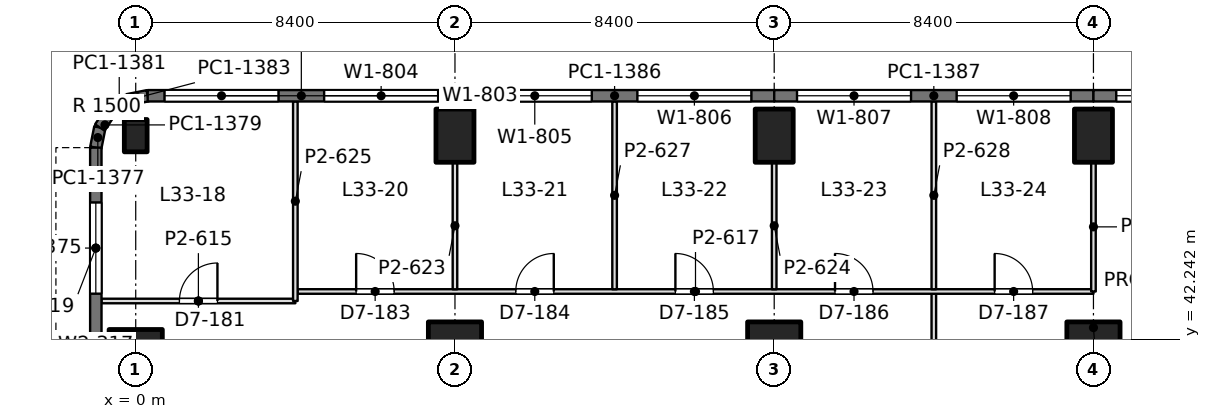
"""IFC4 building model, lengths in metres.
Left out: names, types, materials, properties, quantities, classifications, styles, units other than length and angle.
Written with IfcOpenShell. Run it as: python <this file> out.ifc"""

import sys

from ifc_helpers import new_model, si_unit, direction, frame, frame_2d, origin, origin_2d, place, context, subcontext, project, spatial, rectangle, extrude, element, fill, save


model = new_model("IFC4")
c1 = context("Model", 3, precision=1e-05, world=origin(), true_north=direction((0.0, 1.0)))
c2 = subcontext(c1, "Body", "Model", "MODEL_VIEW")
j1 = project(units=[si_unit("LENGTHUNIT", "METRE"), si_unit("PLANEANGLEUNIT", "RADIAN")], contexts=[c1])
p1 = place(None, origin())
s1 = spatial("IfcSite", under=j1, at=p1, CompositionType="ELEMENT")
p2 = place(p1, origin())
s2 = spatial("IfcBuilding", under=s1, at=p2, CompositionType="ELEMENT")
p3 = place(p2, frame((0.0, 0.0, 147.0)))
s3 = spatial("IfcBuildingStorey", under=s2, at=p3, CompositionType="ELEMENT", Elevation=147.0)
p4 = place(p3, frame((0.0, 42.0, 0.0), z_axis=(0.0, 0.0, 1.0), x_axis=(0.0, 1.0, 0.0)))
e1 = element("IfcColumn", 1, at=p4, inside=s3, PredefinedType="COLUMN", context=c2, shape_type="SweptSolid", body=[
    extrude(rectangle(XDim=1.0, YDim=1.4, at=origin_2d()), origin(), (0.0, 0.0, 1.0), 4.2),
])
p5 = place(p3, frame((0.0, 47.6, 0.0), z_axis=(0.0, 0.0, 1.0), x_axis=(1.0, 0.0, 0.0)))
e2 = element("IfcColumn", 2, at=p5, inside=s3, PredefinedType="COLUMN", context=c2, shape_type="SweptSolid", body=[
    extrude(rectangle(XDim=0.6, YDim=0.85, at=origin_2d()), origin(), (0.0, 0.0, 1.0), 4.2),
])
p6 = place(p3, frame((8.4, 42.0, 0.0), z_axis=(0.0, 0.0, 1.0), x_axis=(1.0, 0.0, 0.0)))
e3 = element("IfcColumn", 3, at=p6, inside=s3, PredefinedType="COLUMN", context=c2, shape_type="SweptSolid", body=[
    extrude(rectangle(XDim=1.4, YDim=1.4, at=origin_2d()), origin(), (0.0, 0.0, 1.0), 4.2),
])
p7 = place(p3, frame((8.4, 47.6, 0.0), z_axis=(0.0, 0.0, 1.0), x_axis=(1.0, 0.0, 0.0)))
e4 = element("IfcColumn", 4, at=p7, inside=s3, PredefinedType="COLUMN", context=c2, shape_type="SweptSolid", body=[
    extrude(rectangle(XDim=1.0, YDim=1.4, at=origin_2d()), origin(), (0.0, 0.0, 1.0), 4.2),
])
p8 = place(p3, frame((16.8, 42.0, 0.0), z_axis=(0.0, 0.0, 1.0), x_axis=(1.0, 0.0, 0.0)))
e5 = element("IfcColumn", 5, at=p8, inside=s3, PredefinedType="COLUMN", context=c2, shape_type="SweptSolid", body=[
    extrude(rectangle(XDim=1.4, YDim=1.4, at=origin_2d()), origin(), (0.0, 0.0, 1.0), 4.2),
])
p9 = place(p3, frame((16.8, 47.6, 0.0), z_axis=(0.0, 0.0, 1.0), x_axis=(1.0, 0.0, 0.0)))
e6 = element("IfcColumn", 6, at=p9, inside=s3, PredefinedType="COLUMN", context=c2, shape_type="SweptSolid", body=[
    extrude(rectangle(XDim=1.0, YDim=1.4, at=origin_2d()), origin(), (0.0, 0.0, 1.0), 4.2),
])
p10 = place(p3, frame((25.2, 42.0, 0.0), z_axis=(0.0, 0.0, 1.0), x_axis=(1.0, 0.0, 0.0)))
e7 = element("IfcColumn", 7, at=p10, inside=s3, PredefinedType="COLUMN", context=c2, shape_type="SweptSolid", body=[
    extrude(rectangle(XDim=1.4, YDim=1.4, at=origin_2d()), origin(), (0.0, 0.0, 1.0), 4.2),
])
p11 = place(p3, frame((25.2, 47.6, 0.0), z_axis=(0.0, 0.0, 1.0), x_axis=(1.0, 0.0, 0.0)))
e8 = element("IfcColumn", 8, at=p11, inside=s3, PredefinedType="COLUMN", context=c2, shape_type="SweptSolid", body=[
    extrude(rectangle(XDim=1.0, YDim=1.4, at=origin_2d()), origin(), (0.0, 0.0, 1.0), 4.2),
])
p12 = place(p3, frame((-1.05, 42.0, 0.0), z_axis=(0.0, 0.0, 1.0), x_axis=(0.0, 1.0, 0.0)))
e9 = element("IfcWall", 9, at=p12, inside=s3, PredefinedType="SOLIDWALL", context=c2, shape_type="SweptSolid", body=[
    extrude(rectangle(XDim=5.285, YDim=0.3, at=frame_2d((2.643, 0.0))), origin(), (0.0, 0.0, 1.0), 4.05),
])
p13 = place(p12, frame((1.443, 0.0, 0.9)))
e10 = element("IfcOpeningElement", 10, at=p13, cuts=e9, PredefinedType="OPENING", context=c2, shape_type="SweptSolid", body=[
    extrude(rectangle(XDim=2.4, YDim=1.9, at=frame_2d((1.2, 0.95))), frame((0.0, 0.16, 0.0), z_axis=(0.0, -1.0, 0.0), x_axis=(1.0, 0.0, 0.0)), (0.0, 0.0, 1.0), 0.32),
])
p14 = place(p3, frame((-1.05, 47.285, 0.0), z_axis=(0.0, 0.0, 1.0), x_axis=(0.195073962632, 0.980788534345, 0.0)))
e11 = element("IfcWall", 11, at=p14, inside=s3, PredefinedType="SOLIDWALL", context=c2, shape_type="SweptSolid", body=[
    extrude(rectangle(XDim=0.541, YDim=0.3, at=frame_2d((0.271, 0.0))), origin(), (0.0, 0.0, 1.0), 4.05),
])
p15 = place(p3, frame((-0.945, 47.815, 0.0), z_axis=(0.0, 0.0, 1.0), x_axis=(0.55534295404, 0.831621430339, 0.0)))
e12 = element("IfcWall", 12, at=p15, inside=s3, PredefinedType="SOLIDWALL", context=c2, shape_type="SweptSolid", body=[
    extrude(rectangle(XDim=0.526, YDim=0.3, at=frame_2d((0.263, 0.0))), origin(), (0.0, 0.0, 1.0), 4.05),
])
p16 = place(p3, frame((-0.653, 48.253, 0.0), z_axis=(0.0, 0.0, 1.0), x_axis=(0.831692711774, 0.555236195849, 0.0)))
e13 = element("IfcWall", 13, at=p16, inside=s3, PredefinedType="SOLIDWALL", context=c2, shape_type="SweptSolid", body=[
    extrude(rectangle(XDim=0.525, YDim=0.3, at=frame_2d((0.263, 0.0))), origin(), (0.0, 0.0, 1.0), 4.05),
])
p17 = place(p3, frame((-0.216, 48.544, 0.0), z_axis=(0.0, 0.0, 1.0), x_axis=(0.980788534345, 0.195073962632, 0.0)))
e14 = element("IfcWall", 14, at=p17, inside=s3, PredefinedType="SOLIDWALL", context=c2, shape_type="SweptSolid", body=[
    extrude(rectangle(XDim=0.541, YDim=0.3, at=frame_2d((0.271, 0.0))), origin(), (0.0, 0.0, 1.0), 4.05),
])
p18 = place(p3, frame((0.315, 48.65, 0.0), z_axis=(0.0, 0.0, 1.0), x_axis=(1.0, 0.0, 0.0)))
e15 = element("IfcWall", 15, at=p18, inside=s3, PredefinedType="SOLIDWALL", context=c2, shape_type="SweptSolid", body=[
    extrude(rectangle(XDim=8.085, YDim=0.3, at=frame_2d((4.042, 0.0))), origin(), (0.0, 0.0, 1.0), 4.05),
])
p19 = place(p18, frame((0.443, 0.0, 0.9)))
e16 = element("IfcOpeningElement", 16, at=p19, cuts=e15, PredefinedType="OPENING", context=c2, shape_type="SweptSolid", body=[
    extrude(rectangle(XDim=3.0, YDim=1.9, at=frame_2d((1.5, 0.95))), frame((0.0, 0.16, 0.0), z_axis=(0.0, -1.0, 0.0), x_axis=(1.0, 0.0, 0.0)), (0.0, 0.0, 1.0), 0.32),
])
p20 = place(p18, frame((4.643, 0.0, 0.9)))
e17 = element("IfcOpeningElement", 17, at=p20, cuts=e15, PredefinedType="OPENING", context=c2, shape_type="SweptSolid", body=[
    extrude(rectangle(XDim=3.0, YDim=1.9, at=frame_2d((1.5, 0.95))), frame((0.0, 0.16, 0.0), z_axis=(0.0, -1.0, 0.0), x_axis=(1.0, 0.0, 0.0)), (0.0, 0.0, 1.0), 0.32),
])
p21 = place(p3, frame((8.4, 48.65, 0.0), z_axis=(0.0, 0.0, 1.0), x_axis=(1.0, 0.0, 0.0)))
e18 = element("IfcWall", 18, at=p21, inside=s3, PredefinedType="SOLIDWALL", context=c2, shape_type="SweptSolid", body=[
    extrude(rectangle(XDim=8.4, YDim=0.3, at=frame_2d((4.2, 0.0))), origin(), (0.0, 0.0, 1.0), 4.05),
])
p22 = place(p21, frame((0.6, 0.0, 0.9)))
e19 = element("IfcOpeningElement", 19, at=p22, cuts=e18, PredefinedType="OPENING", context=c2, shape_type="SweptSolid", body=[
    extrude(rectangle(XDim=3.0, YDim=1.9, at=frame_2d((1.5, 0.95))), frame((0.0, 0.16, 0.0), z_axis=(0.0, -1.0, 0.0), x_axis=(1.0, 0.0, 0.0)), (0.0, 0.0, 1.0), 0.32),
])
p23 = place(p21, frame((4.8, 0.0, 0.9)))
e20 = element("IfcOpeningElement", 20, at=p23, cuts=e18, PredefinedType="OPENING", context=c2, shape_type="SweptSolid", body=[
    extrude(rectangle(XDim=3.0, YDim=1.9, at=frame_2d((1.5, 0.95))), frame((0.0, 0.16, 0.0), z_axis=(0.0, -1.0, 0.0), x_axis=(1.0, 0.0, 0.0)), (0.0, 0.0, 1.0), 0.32),
])
p24 = place(p3, frame((16.8, 48.65, 0.0), z_axis=(0.0, 0.0, 1.0), x_axis=(1.0, 0.0, 0.0)))
e21 = element("IfcWall", 21, at=p24, inside=s3, PredefinedType="SOLIDWALL", context=c2, shape_type="SweptSolid", body=[
    extrude(rectangle(XDim=8.4, YDim=0.3, at=frame_2d((4.2, 0.0))), origin(), (0.0, 0.0, 1.0), 4.05),
])
p25 = place(p24, frame((0.6, 0.0, 0.9)))
e22 = element("IfcOpeningElement", 22, at=p25, cuts=e21, PredefinedType="OPENING", context=c2, shape_type="SweptSolid", body=[
    extrude(rectangle(XDim=3.0, YDim=1.9, at=frame_2d((1.5, 0.95))), frame((0.0, 0.16, 0.0), z_axis=(0.0, -1.0, 0.0), x_axis=(1.0, 0.0, 0.0)), (0.0, 0.0, 1.0), 0.32),
])
p26 = place(p24, frame((4.8, 0.0, 0.9)))
e23 = element("IfcOpeningElement", 23, at=p26, cuts=e21, PredefinedType="OPENING", context=c2, shape_type="SweptSolid", body=[
    extrude(rectangle(XDim=3.0, YDim=1.9, at=frame_2d((1.5, 0.95))), frame((0.0, 0.16, 0.0), z_axis=(0.0, -1.0, 0.0), x_axis=(1.0, 0.0, 0.0)), (0.0, 0.0, 1.0), 0.32),
])
p27 = place(p3, frame((25.2, 48.65, 0.0), z_axis=(0.0, 0.0, 1.0), x_axis=(1.0, 0.0, 0.0)))
e24 = element("IfcWall", 24, at=p27, inside=s3, PredefinedType="SOLIDWALL", context=c2, shape_type="SweptSolid", body=[
    extrude(rectangle(XDim=8.4, YDim=0.3, at=frame_2d((4.2, 0.0))), origin(), (0.0, 0.0, 1.0), 4.05),
])
p28 = place(p27, frame((0.6, 0.0, 0.9)))
e25 = element("IfcOpeningElement", 25, at=p28, cuts=e24, PredefinedType="OPENING", context=c2, shape_type="SweptSolid", body=[
    extrude(rectangle(XDim=3.0, YDim=1.9, at=frame_2d((1.5, 0.95))), frame((0.0, 0.16, 0.0), z_axis=(0.0, -1.0, 0.0), x_axis=(1.0, 0.0, 0.0)), (0.0, 0.0, 1.0), 0.32),
])
p29 = place(p27, frame((4.8, 0.0, 0.9)))
e26 = element("IfcOpeningElement", 26, at=p29, cuts=e24, PredefinedType="OPENING", context=c2, shape_type="SweptSolid", body=[
    extrude(rectangle(XDim=3.0, YDim=1.9, at=frame_2d((1.5, 0.95))), frame((0.0, 0.16, 0.0), z_axis=(0.0, -1.0, 0.0), x_axis=(1.0, 0.0, 0.0)), (0.0, 0.0, 1.0), 0.32),
])
p30 = place(p3, frame((-0.902, 43.25, 0.0), z_axis=(0.0, 0.0, 1.0), x_axis=(1.0, 0.0, 0.0)))
e27 = element("IfcWall", 27, at=p30, inside=s3, PredefinedType="PARTITIONING", context=c2, shape_type="SweptSolid", body=[
    extrude(rectangle(XDim=5.102, YDim=0.12, at=frame_2d((2.551, 0.0))), origin(), (0.0, 0.0, 1.0), 3.56),
])
p31 = place(p30, frame((2.052, 0.0, 0.0)))
e28 = element("IfcOpeningElement", 28, at=p31, cuts=e27, PredefinedType="OPENING", context=c2, shape_type="SweptSolid", body=[
    extrude(rectangle(XDim=1.0, YDim=2.4, at=frame_2d((0.5, 1.2))), frame((0.0, 0.07, 0.0), z_axis=(0.0, -1.0, 0.0), x_axis=(1.0, 0.0, 0.0)), (0.0, 0.0, 1.0), 0.14),
])
p32 = place(p3, frame((4.258, 43.5, 0.0), z_axis=(0.0, 0.0, 1.0), x_axis=(1.0, 0.0, 0.0)))
e29 = element("IfcWall", 29, at=p32, inside=s3, PredefinedType="PARTITIONING", context=c2, shape_type="SweptSolid", body=[
    extrude(rectangle(XDim=20.942, YDim=0.12, at=frame_2d((10.471, 0.0))), origin(), (0.0, 0.0, 1.0), 3.55),
])
p33 = place(p32, frame((1.542, 0.0, 0.0)))
e30 = element("IfcOpeningElement", 30, at=p33, cuts=e29, PredefinedType="OPENING", context=c2, shape_type="SweptSolid", body=[
    extrude(rectangle(XDim=1.0, YDim=2.4, at=frame_2d((0.5, 1.2))), frame((0.0, 0.07, 0.0), z_axis=(0.0, -1.0, 0.0), x_axis=(1.0, 0.0, 0.0)), (0.0, 0.0, 1.0), 0.14),
])
p34 = place(p32, frame((5.742, 0.0, 0.0)))
e31 = element("IfcOpeningElement", 31, at=p34, cuts=e29, PredefinedType="OPENING", context=c2, shape_type="SweptSolid", body=[
    extrude(rectangle(XDim=1.0, YDim=2.4, at=frame_2d((0.5, 1.2))), frame((0.0, 0.07, 0.0), z_axis=(0.0, -1.0, 0.0), x_axis=(1.0, 0.0, 0.0)), (0.0, 0.0, 1.0), 0.14),
])
p35 = place(p32, frame((9.942, 0.0, 0.0)))
e32 = element("IfcOpeningElement", 32, at=p35, cuts=e29, PredefinedType="OPENING", context=c2, shape_type="SweptSolid", body=[
    extrude(rectangle(XDim=1.0, YDim=2.4, at=frame_2d((0.5, 1.2))), frame((0.0, 0.07, 0.0), z_axis=(0.0, -1.0, 0.0), x_axis=(1.0, 0.0, 0.0)), (0.0, 0.0, 1.0), 0.14),
])
p36 = place(p32, frame((14.142, 0.0, 0.0)))
e33 = element("IfcOpeningElement", 33, at=p36, cuts=e29, PredefinedType="OPENING", context=c2, shape_type="SweptSolid", body=[
    extrude(rectangle(XDim=1.0, YDim=2.4, at=frame_2d((0.5, 1.2))), frame((0.0, 0.07, 0.0), z_axis=(0.0, -1.0, 0.0), x_axis=(1.0, 0.0, 0.0)), (0.0, 0.0, 1.0), 0.14),
])
p37 = place(p32, frame((18.342, 0.0, 0.0)))
e34 = element("IfcOpeningElement", 34, at=p37, cuts=e29, PredefinedType="OPENING", context=c2, shape_type="SweptSolid", body=[
    extrude(rectangle(XDim=1.0, YDim=2.4, at=frame_2d((0.5, 1.2))), frame((0.0, 0.07, 0.0), z_axis=(0.0, -1.0, 0.0), x_axis=(1.0, 0.0, 0.0)), (0.0, 0.0, 1.0), 0.14),
])
p38 = place(p3, frame((4.2, 43.25, 0.0), z_axis=(0.0, 0.0, 1.0), x_axis=(0.0, 1.0, 0.0)))
e35 = element("IfcWall", 35, at=p38, inside=s3, PredefinedType="PARTITIONING", context=c2, shape_type="SweptSolid", body=[
    extrude(rectangle(XDim=5.252, YDim=0.12, at=frame_2d((2.626, 0.0))), origin(), (0.0, 0.0, 1.0), 3.56),
])
p39 = place(p3, frame((8.4, 43.558, 0.0), z_axis=(0.0, 0.0, 1.0), x_axis=(0.0, 1.0, 0.0)))
e36 = element("IfcWall", 36, at=p39, inside=s3, PredefinedType="PARTITIONING", context=c2, shape_type="SweptSolid", body=[
    extrude(rectangle(XDim=3.343, YDim=0.12, at=frame_2d((1.671, 0.0))), origin(), (0.0, 0.0, 1.0), 3.55),
])
p40 = place(p3, frame((12.6, 43.558, 0.0), z_axis=(0.0, 0.0, 1.0), x_axis=(0.0, 1.0, 0.0)))
e37 = element("IfcWall", 37, at=p40, inside=s3, PredefinedType="PARTITIONING", context=c2, shape_type="SweptSolid", body=[
    extrude(rectangle(XDim=4.944, YDim=0.12, at=frame_2d((2.472, 0.0))), origin(), (0.0, 0.0, 1.0), 3.56),
])
p41 = place(p3, frame((16.8, 43.558, 0.0), z_axis=(0.0, 0.0, 1.0), x_axis=(0.0, 1.0, 0.0)))
e38 = element("IfcWall", 38, at=p41, inside=s3, PredefinedType="PARTITIONING", context=c2, shape_type="SweptSolid", body=[
    extrude(rectangle(XDim=3.343, YDim=0.12, at=frame_2d((1.671, 0.0))), origin(), (0.0, 0.0, 1.0), 3.55),
])
p42 = place(p3, frame((21.0, 43.558, 0.0), z_axis=(0.0, 0.0, 1.0), x_axis=(0.0, 1.0, 0.0)))
e39 = element("IfcWall", 39, at=p42, inside=s3, PredefinedType="PARTITIONING", context=c2, shape_type="SweptSolid", body=[
    extrude(rectangle(XDim=4.944, YDim=0.12, at=frame_2d((2.472, 0.0))), origin(), (0.0, 0.0, 1.0), 3.56),
])
p43 = place(p3, frame((25.2, 43.5, 0.0), z_axis=(0.0, 0.0, 1.0), x_axis=(0.0, 1.0, 0.0)))
e40 = element("IfcWall", 40, at=p43, inside=s3, PredefinedType="PARTITIONING", context=c2, shape_type="SweptSolid", body=[
    extrude(rectangle(XDim=3.401, YDim=0.12, at=frame_2d((1.7, 0.0))), origin(), (0.0, 0.0, 1.0), 3.55),
])
p44 = place(p3, frame((21.0, 37.858, 0.0), z_axis=(0.0, 0.0, 1.0), x_axis=(0.0, 1.0, 0.0)))
e41 = element("IfcWall", 41, at=p44, inside=s3, PredefinedType="PARTITIONING", context=c2, shape_type="SweptSolid", body=[
    extrude(rectangle(XDim=5.584, YDim=0.12, at=frame_2d((2.792, 0.0))), origin(), (0.0, 0.0, 1.0), 3.55),
])
p45 = place(p13, origin())
e42 = element("IfcWindow", 42, at=p45, inside=s3, PartitioningType="SINGLE_PANEL", PredefinedType="WINDOW", context=c2, shape_type="SweptSolid", body=[
    extrude(rectangle(XDim=2.4, YDim=1.9, at=frame_2d((1.2, 0.95))), frame((0.0, 0.03, 0.0), z_axis=(0.0, -1.0, 0.0), x_axis=(1.0, 0.0, 0.0)), (0.0, 0.0, 1.0), 0.06),
])
fill(e10, e42)
p46 = place(p19, origin())
e43 = element("IfcWindow", 43, at=p46, inside=s3, PartitioningType="SINGLE_PANEL", PredefinedType="WINDOW", context=c2, shape_type="SweptSolid", body=[
    extrude(rectangle(XDim=3.0, YDim=1.9, at=frame_2d((1.5, 0.95))), frame((0.0, 0.03, 0.0), z_axis=(0.0, -1.0, 0.0), x_axis=(1.0, 0.0, 0.0)), (0.0, 0.0, 1.0), 0.06),
])
fill(e16, e43)
p47 = place(p20, origin())
e44 = element("IfcWindow", 44, at=p47, inside=s3, PartitioningType="SINGLE_PANEL", PredefinedType="WINDOW", context=c2, shape_type="SweptSolid", body=[
    extrude(rectangle(XDim=3.0, YDim=1.9, at=frame_2d((1.5, 0.95))), frame((0.0, 0.03, 0.0), z_axis=(0.0, -1.0, 0.0), x_axis=(1.0, 0.0, 0.0)), (0.0, 0.0, 1.0), 0.06),
])
fill(e17, e44)
p48 = place(p22, origin())
e45 = element("IfcWindow", 45, at=p48, inside=s3, PartitioningType="SINGLE_PANEL", PredefinedType="WINDOW", context=c2, shape_type="SweptSolid", body=[
    extrude(rectangle(XDim=3.0, YDim=1.9, at=frame_2d((1.5, 0.95))), frame((0.0, 0.03, 0.0), z_axis=(0.0, -1.0, 0.0), x_axis=(1.0, 0.0, 0.0)), (0.0, 0.0, 1.0), 0.06),
])
fill(e19, e45)
p49 = place(p23, origin())
e46 = element("IfcWindow", 46, at=p49, inside=s3, PartitioningType="SINGLE_PANEL", PredefinedType="WINDOW", context=c2, shape_type="SweptSolid", body=[
    extrude(rectangle(XDim=3.0, YDim=1.9, at=frame_2d((1.5, 0.95))), frame((0.0, 0.03, 0.0), z_axis=(0.0, -1.0, 0.0), x_axis=(1.0, 0.0, 0.0)), (0.0, 0.0, 1.0), 0.06),
])
fill(e20, e46)
p50 = place(p25, origin())
e47 = element("IfcWindow", 47, at=p50, inside=s3, PartitioningType="SINGLE_PANEL", PredefinedType="WINDOW", context=c2, shape_type="SweptSolid", body=[
    extrude(rectangle(XDim=3.0, YDim=1.9, at=frame_2d((1.5, 0.95))), frame((0.0, 0.03, 0.0), z_axis=(0.0, -1.0, 0.0), x_axis=(1.0, 0.0, 0.0)), (0.0, 0.0, 1.0), 0.06),
])
fill(e22, e47)
p51 = place(p26, origin())
e48 = element("IfcWindow", 48, at=p51, inside=s3, PartitioningType="SINGLE_PANEL", PredefinedType="WINDOW", context=c2, shape_type="SweptSolid", body=[
    extrude(rectangle(XDim=3.0, YDim=1.9, at=frame_2d((1.5, 0.95))), frame((0.0, 0.03, 0.0), z_axis=(0.0, -1.0, 0.0), x_axis=(1.0, 0.0, 0.0)), (0.0, 0.0, 1.0), 0.06),
])
fill(e23, e48)
p52 = place(p28, origin())
e49 = element("IfcWindow", 49, at=p52, inside=s3, PartitioningType="SINGLE_PANEL", PredefinedType="WINDOW", context=c2, shape_type="SweptSolid", body=[
    extrude(rectangle(XDim=3.0, YDim=1.9, at=frame_2d((1.5, 0.95))), frame((0.0, 0.03, 0.0), z_axis=(0.0, -1.0, 0.0), x_axis=(1.0, 0.0, 0.0)), (0.0, 0.0, 1.0), 0.06),
])
fill(e25, e49)
p53 = place(p31, origin())
e50 = element("IfcDoor", 50, at=p53, inside=s3, OperationType="SINGLE_SWING_RIGHT", PredefinedType="DOOR", context=c2, shape_type="SweptSolid", body=[
    extrude(rectangle(XDim=1.0, YDim=2.4, at=frame_2d((0.5, 1.2))), frame((0.0, 0.025, 0.0), z_axis=(0.0, -1.0, 0.0), x_axis=(1.0, 0.0, 0.0)), (0.0, 0.0, 1.0), 0.05),
])
fill(e28, e50)
p54 = place(p33, origin())
e51 = element("IfcDoor", 51, at=p54, inside=s3, OperationType="SINGLE_SWING_LEFT", PredefinedType="DOOR", context=c2, shape_type="SweptSolid", body=[
    extrude(rectangle(XDim=1.0, YDim=2.4, at=frame_2d((0.5, 1.2))), frame((0.0, 0.025, 0.0), z_axis=(0.0, -1.0, 0.0), x_axis=(1.0, 0.0, 0.0)), (0.0, 0.0, 1.0), 0.05),
])
fill(e30, e51)
p55 = place(p34, origin())
e52 = element("IfcDoor", 52, at=p55, inside=s3, OperationType="SINGLE_SWING_RIGHT", PredefinedType="DOOR", context=c2, shape_type="SweptSolid", body=[
    extrude(rectangle(XDim=1.0, YDim=2.4, at=frame_2d((0.5, 1.2))), frame((0.0, 0.025, 0.0), z_axis=(0.0, -1.0, 0.0), x_axis=(1.0, 0.0, 0.0)), (0.0, 0.0, 1.0), 0.05),
])
fill(e31, e52)
p56 = place(p35, origin())
e53 = element("IfcDoor", 53, at=p56, inside=s3, OperationType="SINGLE_SWING_LEFT", PredefinedType="DOOR", context=c2, shape_type="SweptSolid", body=[
    extrude(rectangle(XDim=1.0, YDim=2.4, at=frame_2d((0.5, 1.2))), frame((0.0, 0.025, 0.0), z_axis=(0.0, -1.0, 0.0), x_axis=(1.0, 0.0, 0.0)), (0.0, 0.0, 1.0), 0.05),
])
fill(e32, e53)
p57 = place(p36, origin())
e54 = element("IfcDoor", 54, at=p57, inside=s3, OperationType="SINGLE_SWING_LEFT", PredefinedType="DOOR", context=c2, shape_type="SweptSolid", body=[
    extrude(rectangle(XDim=1.0, YDim=2.4, at=frame_2d((0.5, 1.2))), frame((0.0, 0.025, 0.0), z_axis=(0.0, -1.0, 0.0), x_axis=(1.0, 0.0, 0.0)), (0.0, 0.0, 1.0), 0.05),
])
fill(e33, e54)
p58 = place(p37, origin())
e55 = element("IfcDoor", 55, at=p58, inside=s3, OperationType="SINGLE_SWING_LEFT", PredefinedType="DOOR", context=c2, shape_type="SweptSolid", body=[
    extrude(rectangle(XDim=1.0, YDim=2.4, at=frame_2d((0.5, 1.2))), frame((0.0, 0.025, 0.0), z_axis=(0.0, -1.0, 0.0), x_axis=(1.0, 0.0, 0.0)), (0.0, 0.0, 1.0), 0.05),
])
fill(e34, e55)
save(model, sys.argv[1])
